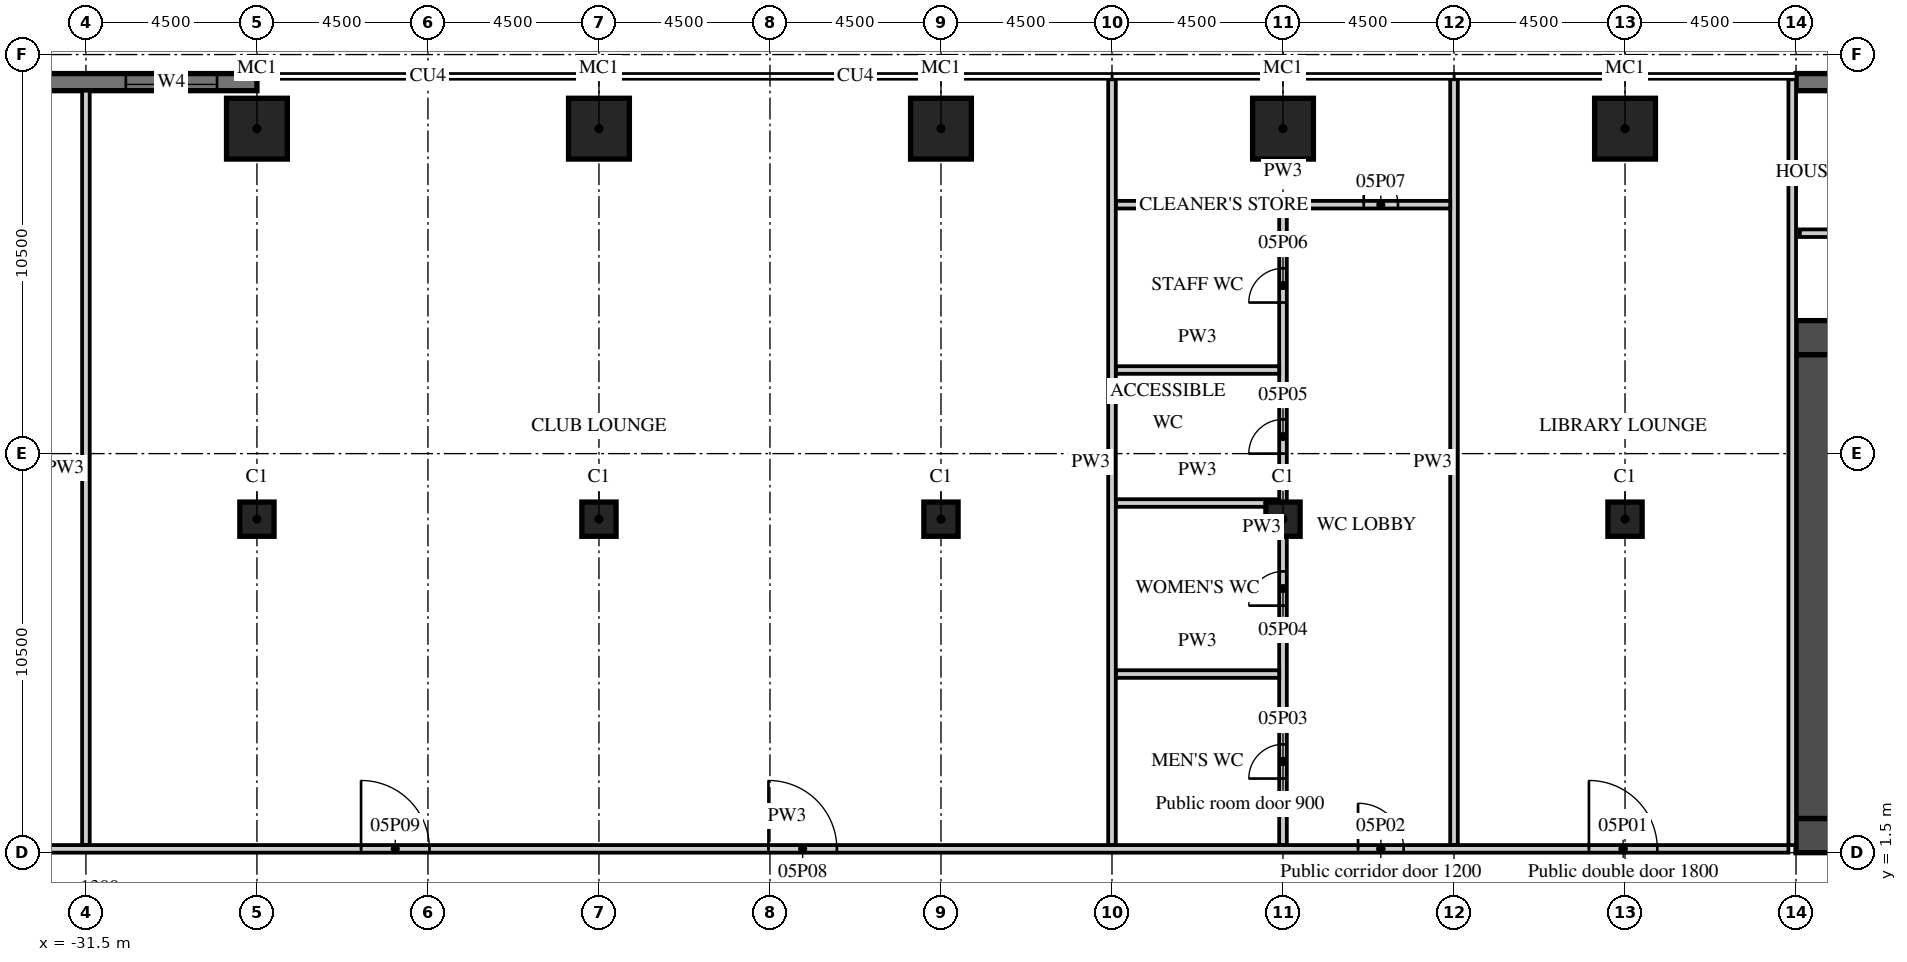
"""IFC4 building model, lengths in metres.
Left out: names, types, materials, properties, quantities, classifications, styles, units other than length and angle.
Written with IfcOpenShell. Run it as: python <this file> out.ifc"""

import sys

from ifc_helpers import new_model, si_unit, direction, frame, frame_2d, origin, origin_2d, place, context, subcontext, project, spatial, rectangle, extrude, element, fill, save


model = new_model("IFC4")
c1 = context("Model", 3, precision=1e-05, world=origin(), true_north=direction((0.0, 1.0)))
c2 = subcontext(c1, "Body", "Model", "MODEL_VIEW")
j1 = project(units=[si_unit("LENGTHUNIT", "METRE"), si_unit("PLANEANGLEUNIT", "RADIAN")], contexts=[c1])
p1 = place(None, origin())
s1 = spatial("IfcSite", under=j1, at=p1, CompositionType="ELEMENT")
p2 = place(p1, origin())
s2 = spatial("IfcBuilding", under=s1, at=p2, CompositionType="ELEMENT")
p3 = place(p2, frame((0.0, 0.0, 33.5)))
s3 = spatial("IfcBuildingStorey", under=s2, at=p3, CompositionType="ELEMENT", Elevation=33.5)
for number, where, z_axis, x_axis in (
    (1, (-27.0, 20.55, 0.0), (0.0, 0.0, 1.0), (1.0, 0.0, 0.0)),
    (2, (-18.0, 20.55, 0.0), (0.0, 0.0, 1.0), (1.0, 0.0, 0.0)),
    (3, (-9.0, 20.55, 0.0), (0.0, 0.0, 1.0), (1.0, 0.0, 0.0)),
    (4, (0.0, 20.55, 0.0), (0.0, 0.0, 1.0), (1.0, 0.0, 0.0)),
    (5, (9.0, 20.55, 0.0), (0.0, 0.0, 1.0), (1.0, 0.0, 0.0)),
):
    element("IfcColumn", number, at=place(p3, frame(where, z_axis=z_axis, x_axis=x_axis)), inside=s3, PredefinedType="COLUMN", context=c2, shape_type="SweptSolid", body=[
        extrude(rectangle(XDim=1.6, YDim=1.6, at=origin_2d()), origin(), (0.0, 0.0, 1.0), 4.5),
    ])
for number, where, z_axis, x_axis in (
    (6, (-27.0, 10.275, 0.0), (0.0, 0.0, 1.0), (1.0, 0.0, 0.0)),
    (7, (-18.0, 10.275, 0.0), (0.0, 0.0, 1.0), (1.0, 0.0, 0.0)),
    (8, (-9.0, 10.275, 0.0), (0.0, 0.0, 1.0), (1.0, 0.0, 0.0)),
    (9, (0.0, 10.275, 0.0), (0.0, 0.0, 1.0), (1.0, 0.0, 0.0)),
    (10, (9.0, 10.275, 0.0), (0.0, 0.0, 1.0), (1.0, 0.0, 0.0)),
):
    element("IfcColumn", number, at=place(p3, frame(where, z_axis=z_axis, x_axis=x_axis)), inside=s3, PredefinedType="COLUMN", context=c2, shape_type="SweptSolid", body=[
        extrude(rectangle(XDim=0.9, YDim=0.9, at=origin_2d()), origin(), (0.0, 0.0, 1.0), 4.5),
    ])
p4 = place(p3, frame((31.5, 21.775, 0.0), z_axis=(0.0, 0.0, 1.0), x_axis=(-1.0, 0.0, 0.0)))
e11 = element("IfcWall", 11, at=p4, inside=s3, PredefinedType="SOLIDWALL", context=c2, shape_type="SweptSolid", body=[
    extrude(rectangle(XDim=18.0, YDim=0.45, at=frame_2d((9.0, 0.0))), origin(), (0.0, 0.0, 1.0), 4.05),
])
p5 = place(p3, frame((-27.0, 21.775, 0.0), z_axis=(0.0, 0.0, 1.0), x_axis=(-1.0, 0.0, 0.0)))
e12 = element("IfcWall", 12, at=p5, inside=s3, PredefinedType="SOLIDWALL", context=c2, shape_type="SweptSolid", body=[
    extrude(rectangle(XDim=14.0, YDim=0.45, at=frame_2d((7.0, 0.0))), origin(), (0.0, 0.0, 1.0), 4.05),
])
p6 = place(p5, frame((1.05, 0.0, 0.9)))
e13 = element("IfcOpeningElement", 13, at=p6, cuts=e12, PredefinedType="OPENING", context=c2, shape_type="SweptSolid", body=[
    extrude(rectangle(XDim=2.4, YDim=1.8, at=frame_2d((1.2, 0.9))), frame((0.0, 0.235, 0.0), z_axis=(0.0, -1.0, 0.0), x_axis=(1.0, 0.0, 0.0)), (0.0, 0.0, 1.0), 0.47),
])
p7 = place(p5, frame((5.55, 0.0, 0.9)))
e14 = element("IfcOpeningElement", 14, at=p7, cuts=e12, PredefinedType="OPENING", context=c2, shape_type="SweptSolid", body=[
    extrude(rectangle(XDim=2.4, YDim=1.8, at=frame_2d((1.2, 0.9))), frame((0.0, 0.235, 0.0), z_axis=(0.0, -1.0, 0.0), x_axis=(1.0, 0.0, 0.0)), (0.0, 0.0, 1.0), 0.47),
])
p8 = place(p3, frame((13.5, 1.95, 0.0), z_axis=(0.0, 0.0, 1.0), x_axis=(1.0, 0.0, 0.0)))
e15 = element("IfcWall", 15, at=p8, inside=s3, PredefinedType="SHEAR", context=c2, shape_type="SweptSolid", body=[
    extrude(rectangle(XDim=18.0, YDim=0.9, at=frame_2d((9.0, 0.0))), origin(), (0.0, 0.0, 1.0), 4.05),
])
p9 = place(p8, frame((1.475, 0.0, 0.0)))
e16 = element("IfcOpeningElement", 16, at=p9, cuts=e15, PredefinedType="OPENING", context=c2, shape_type="SweptSolid", body=[
    extrude(rectangle(XDim=1.8, YDim=2.1, at=frame_2d((0.9, 1.05))), frame((0.0, 0.46, 0.0), z_axis=(0.0, -1.0, 0.0), x_axis=(1.0, 0.0, 0.0)), (0.0, 0.0, 1.0), 0.92),
])
p10 = place(p3, frame((13.5, 15.05, 0.0), z_axis=(0.0, 0.0, 1.0), x_axis=(1.0, 0.0, 0.0)))
e17 = element("IfcWall", 17, at=p10, inside=s3, PredefinedType="SHEAR", context=c2, shape_type="SweptSolid", body=[
    extrude(rectangle(XDim=6.8, YDim=0.9, at=frame_2d((3.4, 0.0))), origin(), (0.0, 0.0, 1.0), 4.05),
])
p11 = place(p10, frame((4.725, 0.0, 0.0)))
e18 = element("IfcOpeningElement", 18, at=p11, cuts=e17, PredefinedType="OPENING", context=c2, shape_type="SweptSolid", body=[
    extrude(rectangle(XDim=1.2, YDim=2.1, at=frame_2d((0.6, 1.05))), frame((0.0, 0.46, 0.0), z_axis=(0.0, -1.0, 0.0), x_axis=(1.0, 0.0, 0.0)), (0.0, 0.0, 1.0), 0.92),
])
p12 = place(p3, frame((13.95, 2.4, 0.0), z_axis=(0.0, 0.0, 1.0), x_axis=(0.0, 1.0, 0.0)))
e19 = element("IfcWall", 19, at=p12, inside=s3, PredefinedType="SHEAR", context=c2, shape_type="SweptSolid", body=[
    extrude(rectangle(XDim=12.2, YDim=0.9, at=frame_2d((6.1, 0.0))), origin(), (0.0, 0.0, 1.0), 4.05),
])
p13 = place(p3, frame((13.6, 17.8, 0.0), z_axis=(0.0, 0.0, 1.0), x_axis=(1.0, 0.0, 0.0)))
e20 = element("IfcWall", 20, at=p13, inside=s3, PredefinedType="PARTITIONING", context=c2, shape_type="SweptSolid", body=[
    extrude(rectangle(XDim=30.95, YDim=0.2, at=frame_2d((15.475, 0.0))), origin(), (0.0, 0.0, 1.0), 4.05),
])
p14 = place(p13, frame((17.812, 0.0, 0.0)))
e21 = element("IfcOpeningElement", 21, at=p14, cuts=e20, PredefinedType="OPENING", context=c2, shape_type="SweptSolid", body=[
    extrude(rectangle(XDim=0.9, YDim=2.1, at=frame_2d((0.45, 1.05))), frame((0.0, 0.11, 0.0), z_axis=(0.0, -1.0, 0.0), x_axis=(1.0, 0.0, 0.0)), (0.0, 0.0, 1.0), 0.22),
])
p15 = place(p13, frame((9.512, 0.0, 0.0)))
e22 = element("IfcOpeningElement", 22, at=p15, cuts=e20, PredefinedType="OPENING", context=c2, shape_type="SweptSolid", body=[
    extrude(rectangle(XDim=0.9, YDim=2.1, at=frame_2d((0.45, 1.05))), frame((0.0, 0.11, 0.0), z_axis=(0.0, -1.0, 0.0), x_axis=(1.0, 0.0, 0.0)), (0.0, 0.0, 1.0), 0.22),
])
p16 = place(p3, frame((4.5, 1.7, 0.0), z_axis=(0.0, 0.0, 1.0), x_axis=(0.0, 1.0, 0.0)))
e23 = element("IfcWall", 23, at=p16, inside=s3, PredefinedType="PARTITIONING", context=c2, shape_type="SweptSolid", body=[
    extrude(rectangle(XDim=20.15, YDim=0.2, at=frame_2d((10.075, 0.0))), origin(), (0.0, 0.0, 1.0), 4.05),
])
p17 = place(p3, frame((0.0, 1.7, 0.0), z_axis=(0.0, 0.0, 1.0), x_axis=(0.0, 1.0, 0.0)))
e24 = element("IfcWall", 24, at=p17, inside=s3, PredefinedType="PARTITIONING", context=c2, shape_type="SweptSolid", body=[
    extrude(rectangle(XDim=16.75, YDim=0.2, at=frame_2d((8.375, 0.0))), origin(), (0.0, 0.0, 1.0), 4.05),
])
p18 = place(p17, frame((1.75, 0.0, 0.0)))
e25 = element("IfcOpeningElement", 25, at=p18, cuts=e24, PredefinedType="OPENING", context=c2, shape_type="SweptSolid", body=[
    extrude(rectangle(XDim=0.9, YDim=2.1, at=frame_2d((0.45, 1.05))), frame((0.0, 0.11, 0.0), z_axis=(0.0, -1.0, 0.0), x_axis=(1.0, 0.0, 0.0)), (0.0, 0.0, 1.0), 0.22),
])
p19 = place(p17, frame((6.3, 0.0, 0.0)))
e26 = element("IfcOpeningElement", 26, at=p19, cuts=e24, PredefinedType="OPENING", context=c2, shape_type="SweptSolid", body=[
    extrude(rectangle(XDim=0.9, YDim=2.1, at=frame_2d((0.45, 1.05))), frame((0.0, 0.11, 0.0), z_axis=(0.0, -1.0, 0.0), x_axis=(1.0, 0.0, 0.0)), (0.0, 0.0, 1.0), 0.22),
])
p20 = place(p17, frame((10.3, 0.0, 0.0)))
e27 = element("IfcOpeningElement", 27, at=p20, cuts=e24, PredefinedType="OPENING", context=c2, shape_type="SweptSolid", body=[
    extrude(rectangle(XDim=0.9, YDim=2.1, at=frame_2d((0.45, 1.05))), frame((0.0, 0.11, 0.0), z_axis=(0.0, -1.0, 0.0), x_axis=(1.0, 0.0, 0.0)), (0.0, 0.0, 1.0), 0.22),
])
p21 = place(p17, frame((14.275, 0.0, 0.0)))
e28 = element("IfcOpeningElement", 28, at=p21, cuts=e24, PredefinedType="OPENING", context=c2, shape_type="SweptSolid", body=[
    extrude(rectangle(XDim=0.9, YDim=2.1, at=frame_2d((0.45, 1.05))), frame((0.0, 0.11, 0.0), z_axis=(0.0, -1.0, 0.0), x_axis=(1.0, 0.0, 0.0)), (0.0, 0.0, 1.0), 0.22),
])
for number, where, z_axis, x_axis in (
    (29, (-4.4, 6.2, 0.0), (0.0, 0.0, 1.0), (1.0, 0.0, 0.0)),
    (30, (-4.4, 10.7, 0.0), (0.0, 0.0, 1.0), (1.0, 0.0, 0.0)),
    (31, (-4.4, 14.2, 0.0), (0.0, 0.0, 1.0), (1.0, 0.0, 0.0)),
):
    element("IfcWall", number, at=place(p3, frame(where, z_axis=z_axis, x_axis=x_axis)), inside=s3, PredefinedType="PARTITIONING", context=c2, shape_type="SweptSolid", body=[
        extrude(rectangle(XDim=4.3, YDim=0.2, at=frame_2d((2.15, 0.0))), origin(), (0.0, 0.0, 1.0), 4.05),
    ])
p22 = place(p3, frame((-4.4, 18.55, 0.0), z_axis=(0.0, 0.0, 1.0), x_axis=(1.0, 0.0, 0.0)))
e32 = element("IfcWall", 32, at=p22, inside=s3, PredefinedType="PARTITIONING", context=c2, shape_type="SweptSolid", body=[
    extrude(rectangle(XDim=8.8, YDim=0.2, at=frame_2d((4.4, 0.0))), origin(), (0.0, 0.0, 1.0), 4.05),
])
p23 = place(p22, frame((6.525, 0.0, 0.0)))
e33 = element("IfcOpeningElement", 33, at=p23, cuts=e32, PredefinedType="OPENING", context=c2, shape_type="SweptSolid", body=[
    extrude(rectangle(XDim=0.9, YDim=2.1, at=frame_2d((0.45, 1.05))), frame((0.0, 0.11, 0.0), z_axis=(0.0, -1.0, 0.0), x_axis=(1.0, 0.0, 0.0)), (0.0, 0.0, 1.0), 0.22),
])
p24 = place(p3, frame((-4.5, 1.7, 0.0), z_axis=(0.0, 0.0, 1.0), x_axis=(0.0, 1.0, 0.0)))
e34 = element("IfcWall", 34, at=p24, inside=s3, PredefinedType="PARTITIONING", context=c2, shape_type="SweptSolid", body=[
    extrude(rectangle(XDim=20.15, YDim=0.2, at=frame_2d((10.075, 0.0))), origin(), (0.0, 0.0, 1.0), 4.05),
])
p25 = place(p3, frame((-31.5, 1.7, 0.0), z_axis=(0.0, 0.0, 1.0), x_axis=(0.0, 1.0, 0.0)))
e35 = element("IfcWall", 35, at=p25, inside=s3, PredefinedType="PARTITIONING", context=c2, shape_type="SweptSolid", body=[
    extrude(rectangle(XDim=19.85, YDim=0.2, at=frame_2d((9.925, 0.0))), origin(), (0.0, 0.0, 1.0), 4.05),
])
p26 = place(p3, frame((-39.4, 1.6, 0.0), z_axis=(0.0, 0.0, 1.0), x_axis=(1.0, 0.0, 0.0)))
e36 = element("IfcWall", 36, at=p26, inside=s3, PredefinedType="PARTITIONING", context=c2, shape_type="SweptSolid", body=[
    extrude(rectangle(XDim=52.7, YDim=0.2, at=frame_2d((26.35, 0.0))), origin(), (0.0, 0.0, 1.0), 4.05),
])
p27 = place(p26, frame((47.45, 0.0, 0.0)))
e37 = element("IfcOpeningElement", 37, at=p27, cuts=e36, PredefinedType="OPENING", context=c2, shape_type="SweptSolid", body=[
    extrude(rectangle(XDim=1.8, YDim=2.1, at=frame_2d((0.9, 1.05))), frame((0.0, 0.11, 0.0), z_axis=(0.0, -1.0, 0.0), x_axis=(1.0, 0.0, 0.0)), (0.0, 0.0, 1.0), 0.22),
])
p28 = place(p26, frame((41.375, 0.0, 0.0)))
e38 = element("IfcOpeningElement", 38, at=p28, cuts=e36, PredefinedType="OPENING", context=c2, shape_type="SweptSolid", body=[
    extrude(rectangle(XDim=1.2, YDim=2.1, at=frame_2d((0.6, 1.05))), frame((0.0, 0.11, 0.0), z_axis=(0.0, -1.0, 0.0), x_axis=(1.0, 0.0, 0.0)), (0.0, 0.0, 1.0), 0.22),
])
p29 = place(p26, frame((25.86, 0.0, 0.0)))
e39 = element("IfcOpeningElement", 39, at=p29, cuts=e36, PredefinedType="OPENING", context=c2, shape_type="SweptSolid", body=[
    extrude(rectangle(XDim=1.8, YDim=2.1, at=frame_2d((0.9, 1.05))), frame((0.0, 0.11, 0.0), z_axis=(0.0, -1.0, 0.0), x_axis=(1.0, 0.0, 0.0)), (0.0, 0.0, 1.0), 0.22),
])
p30 = place(p26, frame((15.14, 0.0, 0.0)))
e40 = element("IfcOpeningElement", 40, at=p30, cuts=e36, PredefinedType="OPENING", context=c2, shape_type="SweptSolid", body=[
    extrude(rectangle(XDim=1.8, YDim=2.1, at=frame_2d((0.9, 1.05))), frame((0.0, 0.11, 0.0), z_axis=(0.0, -1.0, 0.0), x_axis=(1.0, 0.0, 0.0)), (0.0, 0.0, 1.0), 0.22),
])
p31 = place(p26, frame((4.7, 0.0, 0.0)))
e41 = element("IfcOpeningElement", 41, at=p31, cuts=e36, PredefinedType="OPENING", context=c2, shape_type="SweptSolid", body=[
    extrude(rectangle(XDim=1.8, YDim=2.1, at=frame_2d((0.9, 1.05))), frame((0.0, 0.11, 0.0), z_axis=(0.0, -1.0, 0.0), x_axis=(1.0, 0.0, 0.0)), (0.0, 0.0, 1.0), 0.22),
])
p32 = place(p26, frame((1.3, 0.0, 0.0)))
e42 = element("IfcOpeningElement", 42, at=p32, cuts=e36, PredefinedType="OPENING", context=c2, shape_type="SweptSolid", body=[
    extrude(rectangle(XDim=1.8, YDim=2.1, at=frame_2d((0.9, 1.05))), frame((0.0, 0.11, 0.0), z_axis=(0.0, -1.0, 0.0), x_axis=(1.0, 0.0, 0.0)), (0.0, 0.0, 1.0), 0.22),
])
p33 = place(p3, frame((13.4, 1.7, 0.0), z_axis=(0.0, 0.0, 1.0), x_axis=(0.0, 1.0, 0.0)))
e43 = element("IfcWall", 43, at=p33, inside=s3, PredefinedType="PARTITIONING", context=c2, shape_type="SweptSolid", body=[
    extrude(rectangle(XDim=20.15, YDim=0.2, at=frame_2d((10.075, 0.0))), origin(), (0.0, 0.0, 1.0), 4.05),
])
p34 = place(p6, origin())
e44 = element("IfcWindow", 44, at=p34, inside=s3, PartitioningType="SINGLE_PANEL", PredefinedType="WINDOW", context=c2, shape_type="SweptSolid", body=[
    extrude(rectangle(XDim=2.4, YDim=1.8, at=frame_2d((1.2, 0.9))), frame((0.0, 0.09, 0.0), z_axis=(0.0, -1.0, 0.0), x_axis=(1.0, 0.0, 0.0)), (0.0, 0.0, 1.0), 0.06),
])
fill(e13, e44)
p35 = place(p27, origin())
e45 = element("IfcDoor", 45, at=p35, inside=s3, OperationType="DOUBLE_DOOR_DOUBLE_SWING", PredefinedType="DOOR", context=c2, shape_type="SweptSolid", body=[
    extrude(rectangle(XDim=1.8, YDim=2.1, at=frame_2d((0.9, 1.05))), frame((0.0, 0.025, 0.0), z_axis=(0.0, -1.0, 0.0), x_axis=(1.0, 0.0, 0.0)), (0.0, 0.0, 1.0), 0.05),
])
fill(e37, e45)
p36 = place(p28, origin())
e46 = element("IfcDoor", 46, at=p36, inside=s3, OperationType="SINGLE_SWING_LEFT", PredefinedType="DOOR", context=c2, shape_type="SweptSolid", body=[
    extrude(rectangle(XDim=1.2, YDim=2.1, at=frame_2d((0.6, 1.05))), frame((0.0, 0.025, 0.0), z_axis=(0.0, -1.0, 0.0), x_axis=(1.0, 0.0, 0.0)), (0.0, 0.0, 1.0), 0.05),
])
fill(e38, e46)
p37 = place(p18, origin())
e47 = element("IfcDoor", 47, at=p37, inside=s3, OperationType="SINGLE_SWING_LEFT", PredefinedType="DOOR", context=c2, shape_type="SweptSolid", body=[
    extrude(rectangle(XDim=0.9, YDim=2.1, at=frame_2d((0.45, 1.05))), frame((0.0, 0.025, 0.0), z_axis=(0.0, -1.0, 0.0), x_axis=(1.0, 0.0, 0.0)), (0.0, 0.0, 1.0), 0.05),
])
fill(e25, e47)
p38 = place(p19, origin())
e48 = element("IfcDoor", 48, at=p38, inside=s3, OperationType="SINGLE_SWING_LEFT", PredefinedType="DOOR", context=c2, shape_type="SweptSolid", body=[
    extrude(rectangle(XDim=0.9, YDim=2.1, at=frame_2d((0.45, 1.05))), frame((0.0, 0.025, 0.0), z_axis=(0.0, -1.0, 0.0), x_axis=(1.0, 0.0, 0.0)), (0.0, 0.0, 1.0), 0.05),
])
fill(e26, e48)
p39 = place(p20, origin())
e49 = element("IfcDoor", 49, at=p39, inside=s3, OperationType="SINGLE_SWING_LEFT", PredefinedType="DOOR", context=c2, shape_type="SweptSolid", body=[
    extrude(rectangle(XDim=0.9, YDim=2.1, at=frame_2d((0.45, 1.05))), frame((0.0, 0.025, 0.0), z_axis=(0.0, -1.0, 0.0), x_axis=(1.0, 0.0, 0.0)), (0.0, 0.0, 1.0), 0.05),
])
fill(e27, e49)
p40 = place(p21, origin())
e50 = element("IfcDoor", 50, at=p40, inside=s3, OperationType="SINGLE_SWING_LEFT", PredefinedType="DOOR", context=c2, shape_type="SweptSolid", body=[
    extrude(rectangle(XDim=0.9, YDim=2.1, at=frame_2d((0.45, 1.05))), frame((0.0, 0.025, 0.0), z_axis=(0.0, -1.0, 0.0), x_axis=(1.0, 0.0, 0.0)), (0.0, 0.0, 1.0), 0.05),
])
fill(e28, e50)
p41 = place(p23, origin())
e51 = element("IfcDoor", 51, at=p41, inside=s3, OperationType="SINGLE_SWING_LEFT", PredefinedType="DOOR", context=c2, shape_type="SweptSolid", body=[
    extrude(rectangle(XDim=0.9, YDim=2.1, at=frame_2d((0.45, 1.05))), frame((0.0, 0.025, 0.0), z_axis=(0.0, -1.0, 0.0), x_axis=(1.0, 0.0, 0.0)), (0.0, 0.0, 1.0), 0.05),
])
fill(e33, e51)
p42 = place(p29, origin())
e52 = element("IfcDoor", 52, at=p42, inside=s3, OperationType="DOUBLE_DOOR_DOUBLE_SWING", PredefinedType="DOOR", context=c2, shape_type="SweptSolid", body=[
    extrude(rectangle(XDim=1.8, YDim=2.1, at=frame_2d((0.9, 1.05))), frame((0.0, 0.025, 0.0), z_axis=(0.0, -1.0, 0.0), x_axis=(1.0, 0.0, 0.0)), (0.0, 0.0, 1.0), 0.05),
])
fill(e39, e52)
p43 = place(p30, origin())
e53 = element("IfcDoor", 53, at=p43, inside=s3, OperationType="DOUBLE_DOOR_DOUBLE_SWING", PredefinedType="DOOR", context=c2, shape_type="SweptSolid", body=[
    extrude(rectangle(XDim=1.8, YDim=2.1, at=frame_2d((0.9, 1.05))), frame((0.0, 0.025, 0.0), z_axis=(0.0, -1.0, 0.0), x_axis=(1.0, 0.0, 0.0)), (0.0, 0.0, 1.0), 0.05),
])
fill(e40, e53)
save(model, sys.argv[1])
